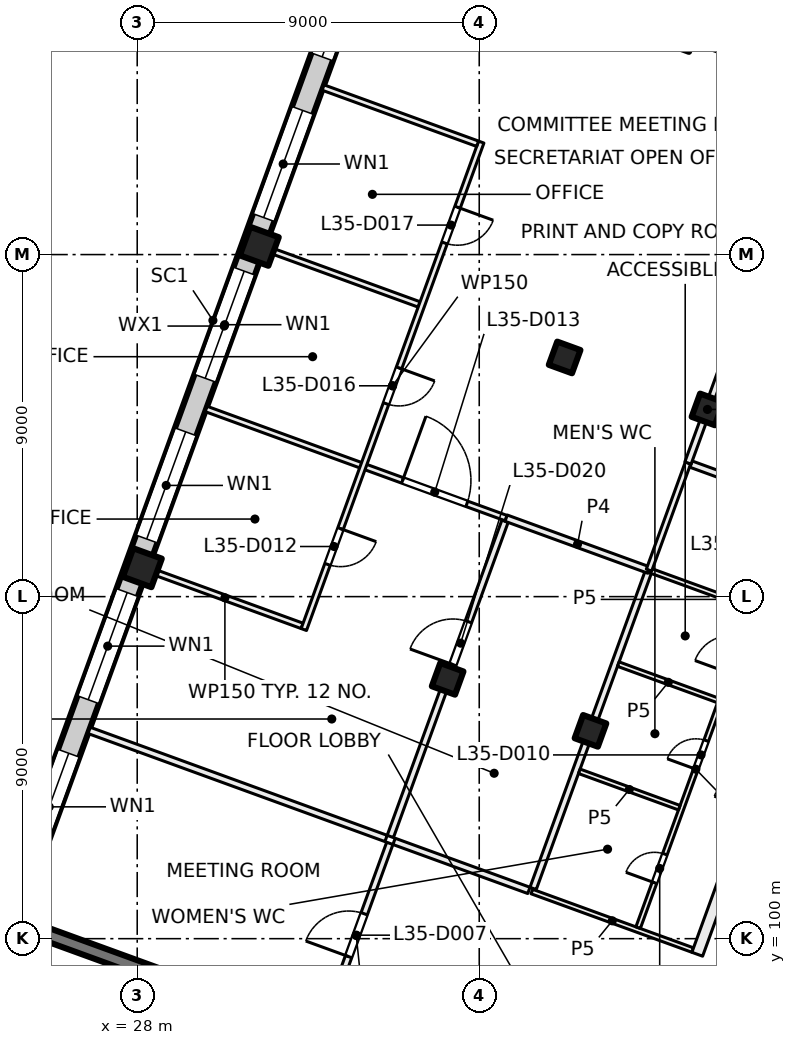
"""IFC4 building model, lengths in metres.
Left out: names, types, materials, properties, quantities, classifications, styles, units other than length and angle.
Written with IfcOpenShell. Run it as: python <this file> out.ifc"""

import sys

from ifc_helpers import new_model, si_unit, direction, frame, frame_2d, origin, origin_2d, place, context, subcontext, project, spatial, rectangle, extrude, element, fill, save


model = new_model("IFC4")
c1 = context("Model", 3, precision=1e-05, world=origin(), true_north=direction((0.0, 1.0)))
c2 = subcontext(c1, "Body", "Model", "MODEL_VIEW")
j1 = project(units=[si_unit("LENGTHUNIT", "METRE"), si_unit("PLANEANGLEUNIT", "RADIAN")], contexts=[c1])
p1 = place(None, origin())
s1 = spatial("IfcSite", under=j1, at=p1, CompositionType="ELEMENT")
p2 = place(p1, origin())
s2 = spatial("IfcBuilding", under=s1, at=p2, CompositionType="ELEMENT")
p3 = place(p2, frame((0.0, 0.0, 150.5)))
s3 = spatial("IfcBuildingStorey", under=s2, at=p3, CompositionType="ELEMENT", Elevation=150.5)
for number, where, z_axis, x_axis in (
    (1, (43.006, 113.925, 0.0), (0.0, 0.0, 1.0), (-0.342, -0.94, 0.0)),
    (2, (39.927, 105.468, 0.0), (0.0, 0.0, 1.0), (-0.342, -0.94, 0.0)),
    (3, (39.247, 115.293, 0.0), (0.0, 0.0, 1.0), (-0.342, -0.94, 0.0)),
    (4, (36.169, 106.836, 0.0), (0.0, 0.0, 1.0), (-0.342, -0.94, 0.0)),
):
    element("IfcColumn", number, at=place(p3, frame(where, z_axis=z_axis, x_axis=x_axis)), inside=s3, PredefinedType="COLUMN", context=c2, shape_type="SweptSolid", body=[
        extrude(rectangle(XDim=0.65, YDim=0.65, at=origin_2d()), origin(), (0.0, 0.0, 1.0), 4.0),
    ])
for number, where, z_axis, x_axis in (
    (5, (31.212, 118.218, 0.0), (0.0, 0.0, 1.0), (-0.342, -0.94, 0.0)),
    (6, (28.134, 109.76, 0.0), (0.0, 0.0, 1.0), (-0.342, -0.94, 0.0)),
):
    element("IfcColumn", number, at=place(p3, frame(where, z_axis=z_axis, x_axis=x_axis)), inside=s3, PredefinedType="COLUMN", context=c2, shape_type="SweptSolid", body=[
        extrude(rectangle(XDim=0.8, YDim=0.8, at=origin_2d()), origin(), (0.0, 0.0, 1.0), 4.0),
    ])
p4 = place(p3, frame((32.962, 97.441, 0.0), z_axis=(0.0, 0.0, 1.0), x_axis=(-0.939689545667, 0.342028592028, 0.0)))
e7 = element("IfcWall", 7, at=p4, inside=s3, PredefinedType="SHEAR", context=c2, shape_type="SweptSolid", body=[
    extrude(rectangle(XDim=8.65, YDim=0.35, at=frame_2d((4.325, 0.0))), origin(), (0.0, 0.0, 1.0), 4.0),
])
p5 = place(p3, frame((24.666, 100.669, 0.0), z_axis=(0.0, 0.0, 1.0), x_axis=(0.34201964167, 0.939692803373, 0.0)))
e8 = element("IfcWall", 8, at=p5, inside=s3, PredefinedType="SOLIDWALL", context=c2, shape_type="SweptSolid", body=[
    extrude(rectangle(XDim=32.884, YDim=0.6, at=frame_2d((16.442, 0.0))), origin(), (0.0, 0.0, 1.0), 3.625),
])
p6 = place(p5, frame((1.48, 0.0, 0.9)))
e9 = element("IfcOpeningElement", 9, at=p6, cuts=e8, PredefinedType="OPENING", context=c2, shape_type="SweptSolid", body=[
    extrude(rectangle(XDim=3.0, YDim=2.4, at=frame_2d((1.5, 1.2))), frame((0.0, 0.31, 0.0), z_axis=(0.0, -1.0, 0.0), x_axis=(1.0, 0.0, 0.0)), (0.0, 0.0, 1.0), 0.62),
])
p7 = place(p5, frame((5.98, 0.0, 0.9)))
e10 = element("IfcOpeningElement", 10, at=p7, cuts=e8, PredefinedType="OPENING", context=c2, shape_type="SweptSolid", body=[
    extrude(rectangle(XDim=3.0, YDim=2.4, at=frame_2d((1.5, 1.2))), frame((0.0, 0.31, 0.0), z_axis=(0.0, -1.0, 0.0), x_axis=(1.0, 0.0, 0.0)), (0.0, 0.0, 1.0), 0.62),
])
p8 = place(p5, frame((10.48, 0.0, 0.9)))
e11 = element("IfcOpeningElement", 11, at=p8, cuts=e8, PredefinedType="OPENING", context=c2, shape_type="SweptSolid", body=[
    extrude(rectangle(XDim=3.0, YDim=2.4, at=frame_2d((1.5, 1.2))), frame((0.0, 0.31, 0.0), z_axis=(0.0, -1.0, 0.0), x_axis=(1.0, 0.0, 0.0)), (0.0, 0.0, 1.0), 0.62),
])
p9 = place(p5, frame((14.98, 0.0, 0.9)))
e12 = element("IfcOpeningElement", 12, at=p9, cuts=e8, PredefinedType="OPENING", context=c2, shape_type="SweptSolid", body=[
    extrude(rectangle(XDim=3.0, YDim=2.4, at=frame_2d((1.5, 1.2))), frame((0.0, 0.31, 0.0), z_axis=(0.0, -1.0, 0.0), x_axis=(1.0, 0.0, 0.0)), (0.0, 0.0, 1.0), 0.62),
])
p10 = place(p5, frame((19.48, 0.0, 0.9)))
e13 = element("IfcOpeningElement", 13, at=p10, cuts=e8, PredefinedType="OPENING", context=c2, shape_type="SweptSolid", body=[
    extrude(rectangle(XDim=3.0, YDim=2.4, at=frame_2d((1.5, 1.2))), frame((0.0, 0.31, 0.0), z_axis=(0.0, -1.0, 0.0), x_axis=(1.0, 0.0, 0.0)), (0.0, 0.0, 1.0), 0.62),
])
p11 = place(p5, frame((23.98, 0.0, 0.9)))
e14 = element("IfcOpeningElement", 14, at=p11, cuts=e8, PredefinedType="OPENING", context=c2, shape_type="SweptSolid", body=[
    extrude(rectangle(XDim=3.0, YDim=2.4, at=frame_2d((1.5, 1.2))), frame((0.0, 0.31, 0.0), z_axis=(0.0, -1.0, 0.0), x_axis=(1.0, 0.0, 0.0)), (0.0, 0.0, 1.0), 0.62),
])
p12 = place(p5, frame((28.48, 0.0, 0.9)))
e15 = element("IfcOpeningElement", 15, at=p12, cuts=e8, PredefinedType="OPENING", context=c2, shape_type="SweptSolid", body=[
    extrude(rectangle(XDim=3.0, YDim=2.4, at=frame_2d((1.5, 1.2))), frame((0.0, 0.31, 0.0), z_axis=(0.0, -1.0, 0.0), x_axis=(1.0, 0.0, 0.0)), (0.0, 0.0, 1.0), 0.62),
])
p13 = place(p3, frame((26.736, 105.48, 0.0), z_axis=(0.0, 0.0, 1.0), x_axis=(0.939705074886, -0.341985924028, 0.0)))
e16 = element("IfcWall", 16, at=p13, inside=s3, PredefinedType="PARTITIONING", context=c2, shape_type="SweptSolid", body=[
    extrude(rectangle(XDim=8.313, YDim=0.175, at=frame_2d((4.157, 0.0))), origin(), (0.0, 0.0, 1.0), 3.625),
])
p14 = place(p3, frame((29.814, 113.938, 0.0), z_axis=(0.0, 0.0, 1.0), x_axis=(0.939698351515, -0.342004397867, 0.0)))
e17 = element("IfcWall", 17, at=p14, inside=s3, PredefinedType="PARTITIONING", context=c2, shape_type="SweptSolid", body=[
    extrude(rectangle(XDim=8.401, YDim=0.15, at=frame_2d((4.2, 0.0))), origin(), (0.0, 0.0, 1.0), 3.625),
])
p15 = place(p14, frame((5.5, 0.0, 0.0)))
e18 = element("IfcOpeningElement", 18, at=p15, cuts=e17, PredefinedType="OPENING", context=c2, shape_type="SweptSolid", body=[
    extrude(rectangle(XDim=1.8, YDim=2.1, at=frame_2d((0.9, 1.05))), frame((0.0, 0.085, 0.0), z_axis=(0.0, -1.0, 0.0), x_axis=(1.0, 0.0, 0.0)), (0.0, 0.0, 1.0), 0.17),
])
p16 = place(p3, frame((31.353, 118.166, 0.0), z_axis=(0.0, 0.0, 1.0), x_axis=(0.939803311208, -0.341715870634, 0.0)))
e19 = element("IfcWall", 19, at=p16, inside=s3, PredefinedType="PARTITIONING", context=c2, shape_type="SweptSolid", body=[
    extrude(rectangle(XDim=4.325, YDim=0.15, at=frame_2d((2.163, 0.0))), origin(), (0.0, 0.0, 1.0), 3.625),
])
p17 = place(p3, frame((32.34, 108.23, 0.0), z_axis=(0.0, 0.0, 1.0), x_axis=(-0.939737385516, 0.341897128188, 0.0)))
e20 = element("IfcWall", 20, at=p17, inside=s3, PredefinedType="PARTITIONING", context=c2, shape_type="SweptSolid", body=[
    extrude(rectangle(XDim=4.326, YDim=0.15, at=frame_2d((2.163, 0.0))), origin(), (0.0, 0.0, 1.0), 3.625),
])
p18 = place(p3, frame((37.053, 120.96, 0.0), z_axis=(0.0, 0.0, 1.0), x_axis=(-0.342064742067, -0.939676386973, 0.0)))
e21 = element("IfcWall", 21, at=p18, inside=s3, PredefinedType="PARTITIONING", context=c2, shape_type="SweptSolid", body=[
    extrude(rectangle(XDim=13.649, YDim=0.15, at=frame_2d((6.825, 0.0))), origin(), (0.0, 0.0, 1.0), 3.625),
])
p19 = place(p18, frame((10.824, 0.0, 0.0)))
e22 = element("IfcOpeningElement", 22, at=p19, cuts=e21, PredefinedType="OPENING", context=c2, shape_type="SweptSolid", body=[
    extrude(rectangle(XDim=1.0, YDim=2.1, at=frame_2d((0.5, 1.05))), frame((0.0, 0.085, 0.0), z_axis=(0.0, -1.0, 0.0), x_axis=(1.0, 0.0, 0.0)), (0.0, 0.0, 1.0), 0.17),
])
p20 = place(p18, frame((6.324, 0.0, 0.0)))
e23 = element("IfcOpeningElement", 23, at=p20, cuts=e21, PredefinedType="OPENING", context=c2, shape_type="SweptSolid", body=[
    extrude(rectangle(XDim=1.0, YDim=2.1, at=frame_2d((0.5, 1.05))), frame((0.0, 0.085, 0.0), z_axis=(0.0, -1.0, 0.0), x_axis=(1.0, 0.0, 0.0)), (0.0, 0.0, 1.0), 0.17),
])
p21 = place(p18, frame((1.824, 0.0, 0.0)))
e24 = element("IfcOpeningElement", 24, at=p21, cuts=e21, PredefinedType="OPENING", context=c2, shape_type="SweptSolid", body=[
    extrude(rectangle(XDim=1.0, YDim=2.1, at=frame_2d((0.5, 1.05))), frame((0.0, 0.085, 0.0), z_axis=(0.0, -1.0, 0.0), x_axis=(1.0, 0.0, 0.0)), (0.0, 0.0, 1.0), 0.17),
])
p22 = place(p3, frame((32.892, 122.395, 0.0), z_axis=(0.0, 0.0, 1.0), x_axis=(0.93973078783, -0.341915262023, 0.0)))
e25 = element("IfcWall", 25, at=p22, inside=s3, PredefinedType="PARTITIONING", context=c2, shape_type="SweptSolid", body=[
    extrude(rectangle(XDim=4.326, YDim=0.15, at=frame_2d((2.163, 0.0))), origin(), (0.0, 0.0, 1.0), 3.625),
])
p23 = place(p3, frame((32.881, 97.657, 0.0), z_axis=(0.0, 0.0, 1.0), x_axis=(0.342058204353, 0.939678766832, 0.0)))
e26 = element("IfcWall", 26, at=p23, inside=s3, PredefinedType="PARTITIONING", context=c2, shape_type="SweptSolid", body=[
    extrude(rectangle(XDim=5.163, YDim=0.175, at=frame_2d((2.581, 0.0))), origin(), (0.0, 0.0, 1.0), 3.625),
])
p24 = place(p23, frame((1.991, 0.0, 0.0)))
e27 = element("IfcOpeningElement", 27, at=p24, cuts=e26, PredefinedType="OPENING", context=c2, shape_type="SweptSolid", body=[
    extrude(rectangle(XDim=1.2, YDim=2.1, at=frame_2d((0.6, 1.05))), frame((0.0, 0.097, 0.0), z_axis=(0.0, -1.0, 0.0), x_axis=(1.0, 0.0, 0.0)), (0.0, 0.0, 1.0), 0.195),
])
p25 = place(p3, frame((34.759, 102.56, 0.0), z_axis=(0.0, 0.0, 1.0), x_axis=(0.939770757411, -0.341805388365, 0.0)))
e28 = element("IfcWall", 28, at=p25, inside=s3, PredefinedType="PARTITIONING", context=c2, shape_type="SweptSolid", body=[
    extrude(rectangle(XDim=3.774, YDim=0.175, at=frame_2d((1.887, 0.0))), origin(), (0.0, 0.0, 1.0), 3.625),
])
p26 = place(p3, frame((34.66, 102.689, 0.0), z_axis=(0.0, 0.0, 1.0), x_axis=(0.341951828534, 0.939717482524, 0.0)))
e29 = element("IfcWall", 29, at=p26, inside=s3, PredefinedType="PARTITIONING", context=c2, shape_type="SweptSolid", body=[
    extrude(rectangle(XDim=8.826, YDim=0.175, at=frame_2d((4.413, 0.0))), origin(), (0.0, 0.0, 1.0), 3.625),
])
p27 = place(p26, frame((4.813, 0.0, 0.0)))
e30 = element("IfcOpeningElement", 30, at=p27, cuts=e29, PredefinedType="OPENING", context=c2, shape_type="SweptSolid", body=[
    extrude(rectangle(XDim=1.2, YDim=2.1, at=frame_2d((0.6, 1.05))), frame((0.0, 0.097, 0.0), z_axis=(0.0, -1.0, 0.0), x_axis=(1.0, 0.0, 0.0)), (0.0, 0.0, 1.0), 0.195),
])
p28 = place(p3, frame((38.385, 101.24, 0.0), z_axis=(0.0, 0.0, 1.0), x_axis=(0.939711088937, -0.341969398235, 0.0)))
e31 = element("IfcWall", 31, at=p28, inside=s3, PredefinedType="PARTITIONING", context=c2, shape_type="SweptSolid", body=[
    extrude(rectangle(XDim=4.503, YDim=0.125, at=frame_2d((2.252, 0.0))), origin(), (0.0, 0.0, 1.0), 3.625),
])
p29 = place(p3, frame((38.418, 101.322, 0.0), z_axis=(0.0, 0.0, 1.0), x_axis=(0.342101536507, 0.939662992099, 0.0)))
e32 = element("IfcWall", 32, at=p29, inside=s3, PredefinedType="PARTITIONING", context=c2, shape_type="SweptSolid", body=[
    extrude(rectangle(XDim=8.913, YDim=0.175, at=frame_2d((4.457, 0.0))), origin(), (0.0, 0.0, 1.0), 3.625),
])
p30 = place(p3, frame((41.181, 100.29, 0.0), z_axis=(0.0, 0.0, 1.0), x_axis=(0.34222012082, 0.939619810831, 0.0)))
e33 = element("IfcWall", 33, at=p30, inside=s3, PredefinedType="PARTITIONING", context=c2, shape_type="SweptSolid", body=[
    extrude(rectangle(XDim=8.875, YDim=0.125, at=frame_2d((4.438, 0.0))), origin(), (0.0, 0.0, 1.0), 3.625),
])
p31 = place(p30, frame((1.258, 0.0, 0.0)))
e34 = element("IfcOpeningElement", 34, at=p31, cuts=e33, PredefinedType="OPENING", context=c2, shape_type="SweptSolid", body=[
    extrude(rectangle(XDim=0.8, YDim=2.1, at=frame_2d((0.4, 1.05))), frame((0.0, 0.073, 0.0), z_axis=(0.0, -1.0, 0.0), x_axis=(1.0, 0.0, 0.0)), (0.0, 0.0, 1.0), 0.145),
])
p32 = place(p30, frame((4.437, 0.0, 0.0)))
e35 = element("IfcOpeningElement", 35, at=p32, cuts=e33, PredefinedType="OPENING", context=c2, shape_type="SweptSolid", body=[
    extrude(rectangle(XDim=0.8, YDim=2.1, at=frame_2d((0.4, 1.05))), frame((0.0, 0.073, 0.0), z_axis=(0.0, -1.0, 0.0), x_axis=(1.0, 0.0, 0.0)), (0.0, 0.0, 1.0), 0.145),
])
p33 = place(p30, frame((7.116, 0.0, 0.0)))
e36 = element("IfcOpeningElement", 36, at=p33, cuts=e33, PredefinedType="OPENING", context=c2, shape_type="SweptSolid", body=[
    extrude(rectangle(XDim=1.0, YDim=2.1, at=frame_2d((0.5, 1.05))), frame((0.0, 0.073, 0.0), z_axis=(0.0, -1.0, 0.0), x_axis=(1.0, 0.0, 0.0)), (0.0, 0.0, 1.0), 0.145),
])
p34 = place(p3, frame((41.467, 109.697, 0.0), z_axis=(0.0, 0.0, 1.0), x_axis=(-0.939713209288, 0.341963571582, 0.0)))
e37 = element("IfcWall", 37, at=p34, inside=s3, PredefinedType="PARTITIONING", context=c2, shape_type="SweptSolid", body=[
    extrude(rectangle(XDim=4.0, YDim=0.175, at=frame_2d((2.0, 0.0))), origin(), (0.0, 0.0, 1.0), 3.625),
])
p35 = place(p3, frame((41.467, 109.697, 0.0), z_axis=(0.0, 0.0, 1.0), x_axis=(0.939609529273, -0.342248349154, 0.0)))
e38 = element("IfcWall", 38, at=p35, inside=s3, PredefinedType="PARTITIONING", context=c2, shape_type="SweptSolid", body=[
    extrude(rectangle(XDim=4.5, YDim=0.125, at=frame_2d((2.25, 0.0))), origin(), (0.0, 0.0, 1.0), 3.625),
])
p36 = place(p3, frame((42.264, 103.446, 0.0), z_axis=(0.0, 0.0, 1.0), x_axis=(-0.939640574808, 0.342163104635, 0.0)))
e39 = element("IfcWall", 39, at=p36, inside=s3, PredefinedType="PARTITIONING", context=c2, shape_type="SweptSolid", body=[
    extrude(rectangle(XDim=2.8, YDim=0.125, at=frame_2d((1.4, 0.0))), origin(), (0.0, 0.0, 1.0), 3.625),
])
p37 = place(p3, frame((42.493, 112.516, 0.0), z_axis=(0.0, 0.0, 1.0), x_axis=(-0.341965219194, -0.939712609717, 0.0)))
e40 = element("IfcWall", 40, at=p37, inside=s3, PredefinedType="PARTITIONING", context=c2, shape_type="SweptSolid", body=[
    extrude(rectangle(XDim=3.0, YDim=0.15, at=frame_2d((1.5, 0.0))), origin(), (0.0, 0.0, 1.0), 3.625),
])
p38 = place(p3, frame((42.575, 112.486, 0.0), z_axis=(0.0, 0.0, 1.0), x_axis=(0.939620446327, -0.342218375959, 0.0)))
e41 = element("IfcWall", 41, at=p38, inside=s3, PredefinedType="PARTITIONING", context=c2, shape_type="SweptSolid", body=[
    extrude(rectangle(XDim=4.412, YDim=0.175, at=frame_2d((2.206, 0.0))), origin(), (0.0, 0.0, 1.0), 3.625),
])
p39 = place(p3, frame((42.737, 99.59, 0.0), z_axis=(0.0, 0.0, 1.0), x_axis=(0.341992703977, 0.939702607438, 0.0)))
e42 = element("IfcWall", 42, at=p39, inside=s3, PredefinedType="PARTITIONING", context=c2, shape_type="SweptSolid", body=[
    extrude(rectangle(XDim=23.006, YDim=0.3, at=frame_2d((11.503, 0.0))), origin(), (0.0, 0.0, 1.0), 3.625),
])
p40 = place(p39, frame((4.062, 0.0, 0.0)))
e43 = element("IfcOpeningElement", 43, at=p40, cuts=e42, PredefinedType="OPENING", context=c2, shape_type="SweptSolid", body=[
    extrude(rectangle(XDim=1.0, YDim=2.1, at=frame_2d((0.5, 1.05))), frame((0.0, 0.16, 0.0), z_axis=(0.0, -1.0, 0.0), x_axis=(1.0, 0.0, 0.0)), (0.0, 0.0, 1.0), 0.32),
])
p41 = place(p39, frame((10.162, 0.0, 0.0)))
e44 = element("IfcOpeningElement", 44, at=p41, cuts=e42, PredefinedType="OPENING", context=c2, shape_type="SweptSolid", body=[
    extrude(rectangle(XDim=0.8, YDim=2.1, at=frame_2d((0.4, 1.05))), frame((0.0, 0.16, 0.0), z_axis=(0.0, -1.0, 0.0), x_axis=(1.0, 0.0, 0.0)), (0.0, 0.0, 1.0), 0.32),
])
p42 = place(p39, frame((13.712, 0.0, 0.0)))
e45 = element("IfcOpeningElement", 45, at=p42, cuts=e42, PredefinedType="OPENING", context=c2, shape_type="SweptSolid", body=[
    extrude(rectangle(XDim=1.2, YDim=2.1, at=frame_2d((0.6, 1.05))), frame((0.0, 0.16, 0.0), z_axis=(0.0, -1.0, 0.0), x_axis=(1.0, 0.0, 0.0)), (0.0, 0.0, 1.0), 0.32),
])
p43 = place(p39, frame((18.662, 0.0, 0.0)))
e46 = element("IfcOpeningElement", 46, at=p43, cuts=e42, PredefinedType="OPENING", context=c2, shape_type="SweptSolid", body=[
    extrude(rectangle(XDim=1.8, YDim=2.1, at=frame_2d((0.9, 1.05))), frame((0.0, 0.16, 0.0), z_axis=(0.0, -1.0, 0.0), x_axis=(1.0, 0.0, 0.0)), (0.0, 0.0, 1.0), 0.32),
])
p44 = place(p3, frame((43.29, 106.266, 0.0), z_axis=(0.0, 0.0, 1.0), x_axis=(-0.939650782256, 0.342135071873, 0.0)))
e47 = element("IfcWall", 47, at=p44, inside=s3, PredefinedType="PARTITIONING", context=c2, shape_type="SweptSolid", body=[
    extrude(rectangle(XDim=2.8, YDim=0.125, at=frame_2d((1.4, 0.0))), origin(), (0.0, 0.0, 1.0), 3.625),
])
p45 = place(p3, frame((44.002, 116.662, 0.0), z_axis=(0.0, 0.0, 1.0), x_axis=(-0.342022951975, -0.939691598517, 0.0)))
e48 = element("IfcWall", 48, at=p45, inside=s3, PredefinedType="PARTITIONING", context=c2, shape_type="SweptSolid", body=[
    extrude(rectangle(XDim=4.412, YDim=0.175, at=frame_2d((2.206, 0.0))), origin(), (0.0, 0.0, 1.0), 3.625),
])
p46 = place(p3, frame((50.311, 120.843, 0.0), z_axis=(0.0, 0.0, 1.0), x_axis=(-0.939664702396, 0.342096838733, 0.0)))
e49 = element("IfcWall", 49, at=p46, inside=s3, PredefinedType="PARTITIONING", context=c2, shape_type="SweptSolid", body=[
    extrude(rectangle(XDim=16.899, YDim=0.15, at=frame_2d((8.449, 0.0))), origin(), (0.0, 0.0, 1.0), 3.625),
])
p47 = place(p6, origin())
e50 = element("IfcWindow", 50, at=p47, inside=s3, PartitioningType="SINGLE_PANEL", PredefinedType="WINDOW", context=c2, shape_type="SweptSolid", body=[
    extrude(rectangle(XDim=3.0, YDim=2.4, at=frame_2d((1.5, 1.2))), frame((0.0, 0.03, 0.0), z_axis=(0.0, -1.0, 0.0), x_axis=(1.0, 0.0, 0.0)), (0.0, 0.0, 1.0), 0.06),
])
fill(e9, e50)
p48 = place(p7, origin())
e51 = element("IfcWindow", 51, at=p48, inside=s3, PartitioningType="SINGLE_PANEL", PredefinedType="WINDOW", context=c2, shape_type="SweptSolid", body=[
    extrude(rectangle(XDim=3.0, YDim=2.4, at=frame_2d((1.5, 1.2))), frame((0.0, 0.03, 0.0), z_axis=(0.0, -1.0, 0.0), x_axis=(1.0, 0.0, 0.0)), (0.0, 0.0, 1.0), 0.06),
])
fill(e10, e51)
p49 = place(p8, origin())
e52 = element("IfcWindow", 52, at=p49, inside=s3, PartitioningType="SINGLE_PANEL", PredefinedType="WINDOW", context=c2, shape_type="SweptSolid", body=[
    extrude(rectangle(XDim=3.0, YDim=2.4, at=frame_2d((1.5, 1.2))), frame((0.0, 0.03, 0.0), z_axis=(0.0, -1.0, 0.0), x_axis=(1.0, 0.0, 0.0)), (0.0, 0.0, 1.0), 0.06),
])
fill(e11, e52)
p50 = place(p9, origin())
e53 = element("IfcWindow", 53, at=p50, inside=s3, PartitioningType="SINGLE_PANEL", PredefinedType="WINDOW", context=c2, shape_type="SweptSolid", body=[
    extrude(rectangle(XDim=3.0, YDim=2.4, at=frame_2d((1.5, 1.2))), frame((0.0, 0.03, 0.0), z_axis=(0.0, -1.0, 0.0), x_axis=(1.0, 0.0, 0.0)), (0.0, 0.0, 1.0), 0.06),
])
fill(e12, e53)
p51 = place(p10, origin())
e54 = element("IfcWindow", 54, at=p51, inside=s3, PartitioningType="SINGLE_PANEL", PredefinedType="WINDOW", context=c2, shape_type="SweptSolid", body=[
    extrude(rectangle(XDim=3.0, YDim=2.4, at=frame_2d((1.5, 1.2))), frame((0.0, 0.03, 0.0), z_axis=(0.0, -1.0, 0.0), x_axis=(1.0, 0.0, 0.0)), (0.0, 0.0, 1.0), 0.06),
])
fill(e13, e54)
p52 = place(p11, origin())
e55 = element("IfcWindow", 55, at=p52, inside=s3, PartitioningType="SINGLE_PANEL", PredefinedType="WINDOW", context=c2, shape_type="SweptSolid", body=[
    extrude(rectangle(XDim=3.0, YDim=2.4, at=frame_2d((1.5, 1.2))), frame((0.0, 0.03, 0.0), z_axis=(0.0, -1.0, 0.0), x_axis=(1.0, 0.0, 0.0)), (0.0, 0.0, 1.0), 0.06),
])
fill(e14, e55)
p53 = place(p24, origin())
e56 = element("IfcDoor", 56, at=p53, inside=s3, OperationType="DOUBLE_DOOR_SINGLE_SWING", PredefinedType="DOOR", context=c2, shape_type="SweptSolid", body=[
    extrude(rectangle(XDim=1.2, YDim=2.1, at=frame_2d((0.6, 1.05))), frame((0.0, 0.025, 0.0), z_axis=(0.0, -1.0, 0.0), x_axis=(1.0, 0.0, 0.0)), (0.0, 0.0, 1.0), 0.05),
])
fill(e27, e56)
p54 = place(p31, origin())
e57 = element("IfcDoor", 57, at=p54, inside=s3, OperationType="SINGLE_SWING_LEFT", PredefinedType="DOOR", context=c2, shape_type="SweptSolid", body=[
    extrude(rectangle(XDim=0.8, YDim=2.1, at=frame_2d((0.4, 1.05))), frame((0.0, 0.025, 0.0), z_axis=(0.0, -1.0, 0.0), x_axis=(1.0, 0.0, 0.0)), (0.0, 0.0, 1.0), 0.05),
])
fill(e34, e57)
p55 = place(p32, origin())
e58 = element("IfcDoor", 58, at=p55, inside=s3, OperationType="SINGLE_SWING_LEFT", PredefinedType="DOOR", context=c2, shape_type="SweptSolid", body=[
    extrude(rectangle(XDim=0.8, YDim=2.1, at=frame_2d((0.4, 1.05))), frame((0.0, 0.025, 0.0), z_axis=(0.0, -1.0, 0.0), x_axis=(1.0, 0.0, 0.0)), (0.0, 0.0, 1.0), 0.05),
])
fill(e35, e58)
p56 = place(p19, origin())
e59 = element("IfcDoor", 59, at=p56, inside=s3, OperationType="SINGLE_SWING_LEFT", PredefinedType="DOOR", context=c2, shape_type="SweptSolid", body=[
    extrude(rectangle(XDim=1.0, YDim=2.1, at=frame_2d((0.5, 1.05))), frame((0.0, 0.025, 0.0), z_axis=(0.0, -1.0, 0.0), x_axis=(1.0, 0.0, 0.0)), (0.0, 0.0, 1.0), 0.05),
])
fill(e22, e59)
p57 = place(p15, origin())
e60 = element("IfcDoor", 60, at=p57, inside=s3, OperationType="DOUBLE_DOOR_SINGLE_SWING", PredefinedType="DOOR", context=c2, shape_type="SweptSolid", body=[
    extrude(rectangle(XDim=1.8, YDim=2.1, at=frame_2d((0.9, 1.05))), frame((0.0, 0.025, 0.0), z_axis=(0.0, -1.0, 0.0), x_axis=(1.0, 0.0, 0.0)), (0.0, 0.0, 1.0), 0.05),
])
fill(e18, e60)
p58 = place(p20, origin())
e61 = element("IfcDoor", 61, at=p58, inside=s3, OperationType="SINGLE_SWING_RIGHT", PredefinedType="DOOR", context=c2, shape_type="SweptSolid", body=[
    extrude(rectangle(XDim=1.0, YDim=2.1, at=frame_2d((0.5, 1.05))), frame((0.0, 0.025, 0.0), z_axis=(0.0, -1.0, 0.0), x_axis=(1.0, 0.0, 0.0)), (0.0, 0.0, 1.0), 0.05),
])
fill(e23, e61)
p59 = place(p21, origin())
e62 = element("IfcDoor", 62, at=p59, inside=s3, OperationType="SINGLE_SWING_LEFT", PredefinedType="DOOR", context=c2, shape_type="SweptSolid", body=[
    extrude(rectangle(XDim=1.0, YDim=2.1, at=frame_2d((0.5, 1.05))), frame((0.0, 0.025, 0.0), z_axis=(0.0, -1.0, 0.0), x_axis=(1.0, 0.0, 0.0)), (0.0, 0.0, 1.0), 0.05),
])
fill(e24, e62)
p60 = place(p27, origin())
e63 = element("IfcDoor", 63, at=p60, inside=s3, OperationType="DOUBLE_DOOR_SINGLE_SWING", PredefinedType="DOOR", context=c2, shape_type="SweptSolid", body=[
    extrude(rectangle(XDim=1.2, YDim=2.1, at=frame_2d((0.6, 1.05))), frame((0.0, 0.025, 0.0), z_axis=(0.0, -1.0, 0.0), x_axis=(1.0, 0.0, 0.0)), (0.0, 0.0, 1.0), 0.05),
])
fill(e30, e63)
save(model, sys.argv[1])
